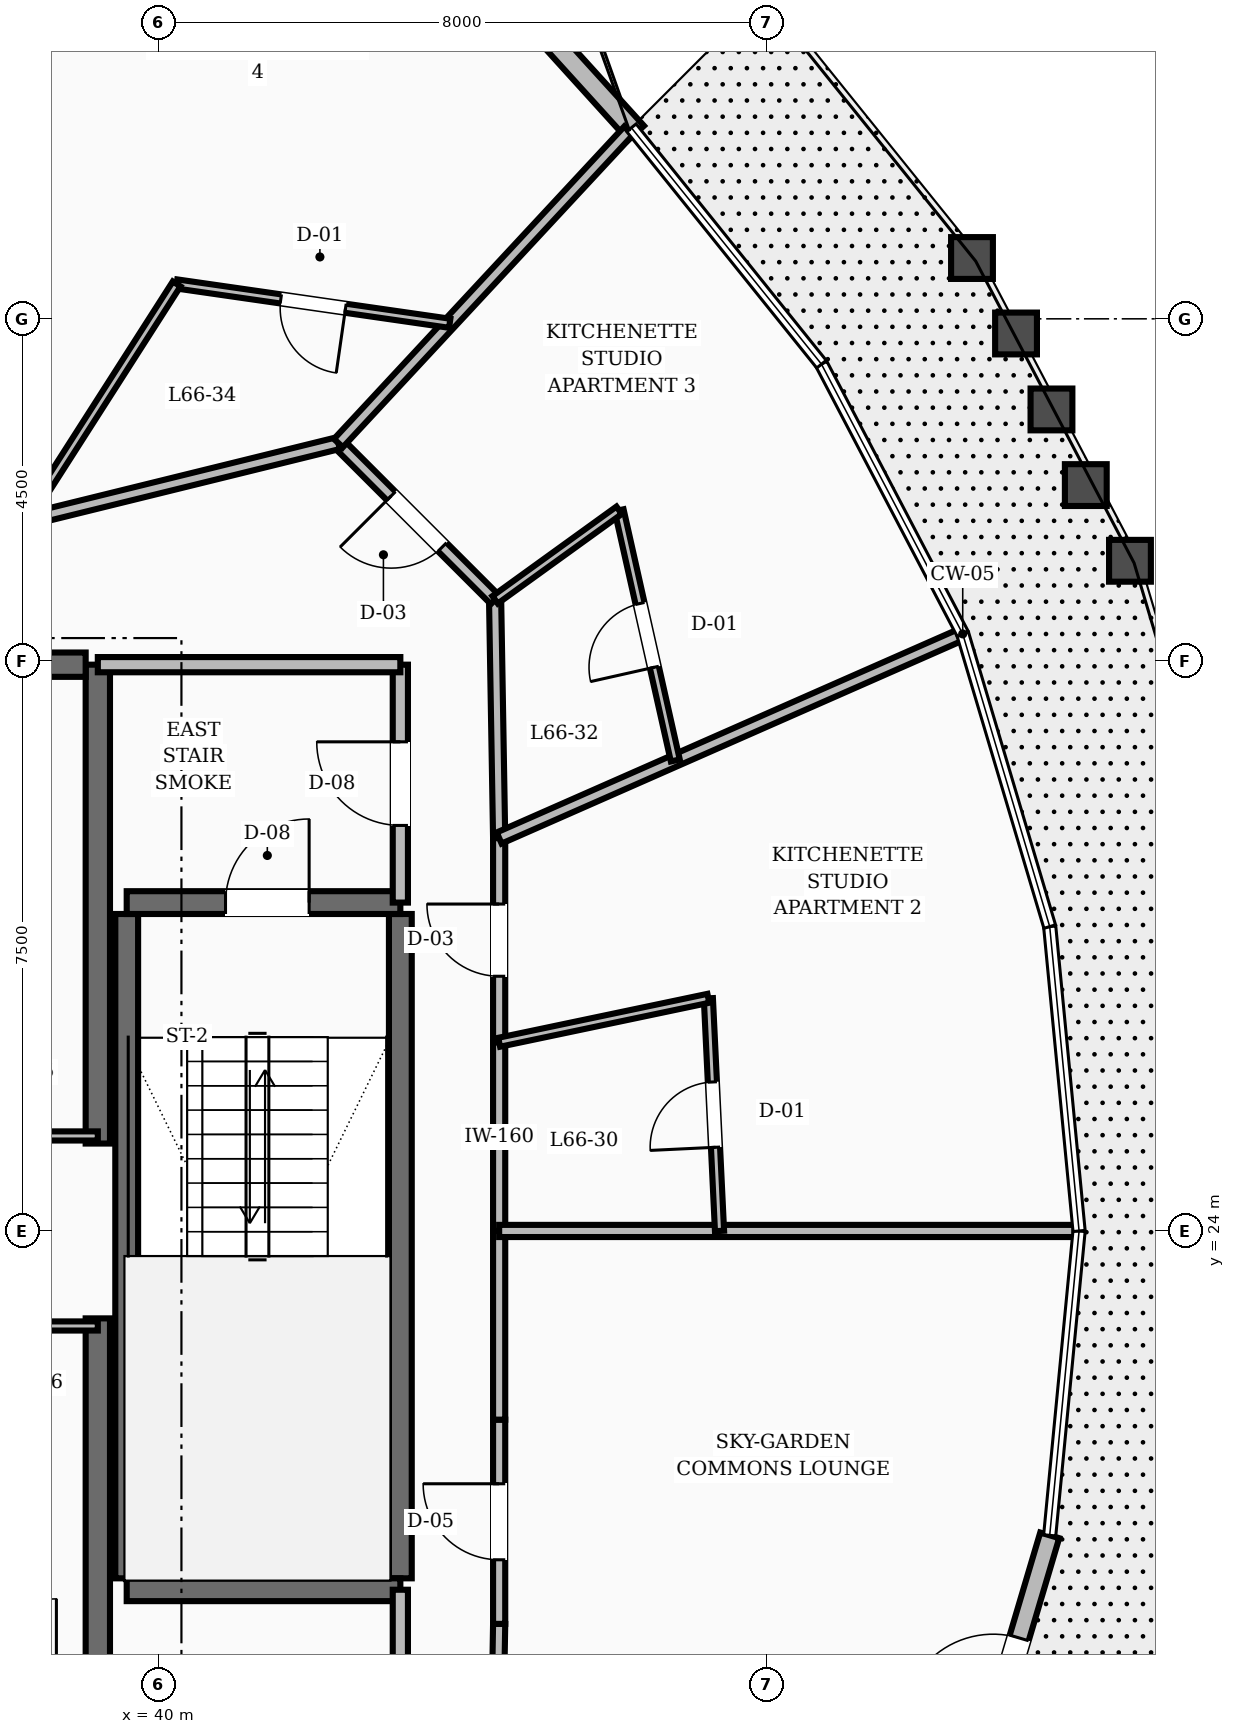
"""IFC4 building model, lengths in metres.
Left out: names, types, materials, properties, quantities, classifications, styles, units other than length and angle.
Written with IfcOpenShell. Run it as: python <this file> out.ifc"""

import sys

from ifc_helpers import new_model, si_unit, direction, frame, frame_2d, origin, place, context, subcontext, project, spatial, rectangle, extrude, element, fill, save


model = new_model("IFC4")
c1 = context("Model", 3, precision=1e-05, world=origin(), true_north=direction((0.0, 1.0)))
c2 = subcontext(c1, "Body", "Model", "MODEL_VIEW")
j1 = project(units=[si_unit("LENGTHUNIT", "METRE"), si_unit("PLANEANGLEUNIT", "RADIAN")], contexts=[c1])
p1 = place(None, origin())
s1 = spatial("IfcSite", under=j1, at=p1, CompositionType="ELEMENT")
p2 = place(p1, origin())
s2 = spatial("IfcBuilding", under=s1, at=p2, CompositionType="ELEMENT")
p3 = place(p2, frame((0.0, 0.0, 254.4)))
s3 = spatial("IfcBuildingStorey", under=s2, at=p3, CompositionType="ELEMENT", Elevation=254.4)
for number, where, z_axis, x_axis in (
    (1, (39.2, 16.55, 0.0), (0.0, 0.0, 1.0), (0.0, 1.0, 0.0)),
    (2, (39.2, 25.15, 0.0), (0.0, 0.0, 1.0), (0.0, 1.0, 0.0)),
):
    element("IfcWall", number, at=place(p3, frame(where, z_axis=z_axis, x_axis=x_axis)), inside=s3, PredefinedType="SHEAR", context=c2, shape_type="SweptSolid", body=[
        extrude(rectangle(XDim=6.3, YDim=0.32, at=frame_2d((3.15, 0.0))), origin(), (0.0, 0.0, 1.0), 3.6),
    ])
p4 = place(p3, frame((35.8, 31.45, 0.0), z_axis=(0.0, 0.0, 1.0), x_axis=(1.0, 0.0, 0.0)))
e3 = element("IfcWall", 3, at=p4, inside=s3, PredefinedType="SHEAR", context=c2, shape_type="SweptSolid", body=[
    extrude(rectangle(XDim=3.24, YDim=0.32, at=frame_2d((1.62, 0.0))), origin(), (0.0, 0.0, 1.0), 3.6),
])
p5 = place(p4, frame((0.3, 0.0, 0.0)))
e4 = element("IfcOpeningElement", 4, at=p5, cuts=e3, PredefinedType="OPENING", context=c2, shape_type="SweptSolid", body=[
    extrude(rectangle(XDim=1.1, YDim=2.1, at=frame_2d((0.55, 1.05))), frame((0.0, 0.17, 0.0), z_axis=(0.0, -1.0, 0.0), x_axis=(1.0, 0.0, 0.0)), (0.0, 0.0, 1.0), 0.34),
])
for number, where, z_axis, x_axis in (
    (5, (43.18, 19.43, 0.0), (0.0, 0.0, 1.0), (0.0, 1.0, 0.0)),
    (6, (39.58, 19.43, 0.0), (0.0, 0.0, 1.0), (0.0, 1.0, 0.0)),
):
    element("IfcWall", number, at=place(p3, frame(where, z_axis=z_axis, x_axis=x_axis)), inside=s3, PredefinedType="SHEAR", context=c2, shape_type="SweptSolid", body=[
        extrude(rectangle(XDim=8.74, YDim=0.3, at=frame_2d((4.37, 0.0))), origin(), (0.0, 0.0, 1.0), 3.6),
    ])
p6 = place(p3, frame((39.58, 19.28, 0.0), z_axis=(0.0, 0.0, 1.0), x_axis=(1.0, 0.0, 0.0)))
e7 = element("IfcWall", 7, at=p6, inside=s3, PredefinedType="SHEAR", context=c2, shape_type="SweptSolid", body=[
    extrude(rectangle(XDim=3.6, YDim=0.3, at=frame_2d((1.8, 0.0))), origin(), (0.0, 0.0, 1.0), 3.6),
])
p7 = place(p3, frame((39.58, 28.32, 0.0), z_axis=(0.0, 0.0, 1.0), x_axis=(1.0, 0.0, 0.0)))
e8 = element("IfcWall", 8, at=p7, inside=s3, PredefinedType="SHEAR", context=c2, shape_type="SweptSolid", body=[
    extrude(rectangle(XDim=3.6, YDim=0.3, at=frame_2d((1.8, 0.0))), origin(), (0.0, 0.0, 1.0), 3.6),
])
p8 = place(p7, frame((1.3, 0.0, 0.0)))
e9 = element("IfcOpeningElement", 9, at=p8, cuts=e8, PredefinedType="OPENING", context=c2, shape_type="SweptSolid", body=[
    extrude(rectangle(XDim=1.1, YDim=2.1, at=frame_2d((0.55, 1.05))), frame((0.0, 0.16, 0.0), z_axis=(0.0, -1.0, 0.0), x_axis=(1.0, 0.0, 0.0)), (0.0, 0.0, 1.0), 0.32),
])
p9 = place(p3, frame((46.281, 38.446, 0.0), z_axis=(0.0, 0.0, 1.0), x_axis=(-0.67165415444, 0.740864830332, 0.0)))
e10 = element("IfcWall", 10, at=p9, inside=s3, PredefinedType="STANDARD", context=c2, shape_type="SweptSolid", body=[
    extrude(rectangle(XDim=4.166, YDim=0.28, at=frame_2d((2.083, 0.0))), origin(), (0.0, 0.0, 1.0), 2.88),
])
p10 = place(p3, frame((50.579, 16.145, 0.0), z_axis=(0.0, 0.0, 1.0), x_axis=(0.284876689728, 0.9585641719, 0.0)))
e11 = element("IfcWall", 11, at=p10, inside=s3, PredefinedType="STANDARD", context=c2, shape_type="SweptSolid", body=[
    extrude(rectangle(XDim=4.017, YDim=0.26, at=frame_2d((2.008, 0.0))), origin(), (0.0, 0.0, 1.0), 2.88),
])
p11 = place(p10, frame((1.408, 0.0, 0.0)))
e12 = element("IfcOpeningElement", 12, at=p11, cuts=e11, PredefinedType="OPENING", context=c2, shape_type="SweptSolid", body=[
    extrude(rectangle(XDim=1.2, YDim=2.15, at=frame_2d((0.6, 1.075))), frame((0.0, 0.14, 0.0), z_axis=(0.0, -1.0, 0.0), x_axis=(1.0, 0.0, 0.0)), (0.0, 0.0, 1.0), 0.28),
])
p12 = place(p3, frame((43.18, 28.32, 0.0), z_axis=(0.0, 0.0, 1.0), x_axis=(0.0, 1.0, 0.0)))
e13 = element("IfcWall", 13, at=p12, inside=s3, PredefinedType="SOLIDWALL", context=c2, shape_type="SweptSolid", body=[
    extrude(rectangle(XDim=3.13, YDim=0.2, at=frame_2d((1.565, 0.0))), origin(), (0.0, 0.0, 1.0), 2.87),
])
p13 = place(p12, frame((1.015, 0.0, 0.0)))
e14 = element("IfcOpeningElement", 14, at=p13, cuts=e13, PredefinedType="OPENING", context=c2, shape_type="SweptSolid", body=[
    extrude(rectangle(XDim=1.1, YDim=2.1, at=frame_2d((0.55, 1.05))), frame((0.0, 0.11, 0.0), z_axis=(0.0, -1.0, 0.0), x_axis=(1.0, 0.0, 0.0)), (0.0, 0.0, 1.0), 0.22),
])
p14 = place(p3, frame((39.2, 31.45, 0.0), z_axis=(0.0, 0.0, 1.0), x_axis=(1.0, 0.0, 0.0)))
e15 = element("IfcWall", 15, at=p14, inside=s3, PredefinedType="SOLIDWALL", context=c2, shape_type="SweptSolid", body=[
    extrude(rectangle(XDim=3.98, YDim=0.2, at=frame_2d((1.99, 0.0))), origin(), (0.0, 0.0, 1.0), 2.87),
])
p15 = place(p3, frame((43.18, 16.55, 0.0), z_axis=(0.0, 0.0, 1.0), x_axis=(0.0, 1.0, 0.0)))
e16 = element("IfcWall", 16, at=p15, inside=s3, PredefinedType="SOLIDWALL", context=c2, shape_type="SweptSolid", body=[
    extrude(rectangle(XDim=2.73, YDim=0.2, at=frame_2d((1.365, 0.0))), origin(), (0.0, 0.0, 1.0), 2.87),
])
p16 = place(p15, frame((0.89, 0.0, 0.0)))
e17 = element("IfcOpeningElement", 17, at=p16, cuts=e16, PredefinedType="OPENING", context=c2, shape_type="SweptSolid", body=[
    extrude(rectangle(XDim=0.95, YDim=2.1, at=frame_2d((0.475, 1.05))), frame((0.0, 0.11, 0.0), z_axis=(0.0, -1.0, 0.0), x_axis=(1.0, 0.0, 0.0)), (0.0, 0.0, 1.0), 0.22),
])
for number, where, z_axis, x_axis in (
    (18, (37.4, 25.25, 0.0), (0.0, 0.0, 1.0), (1.0, 0.0, 0.0)),
    (19, (37.4, 22.75, 0.0), (0.0, 0.0, 1.0), (1.0, 0.0, 0.0)),
):
    element("IfcWall", number, at=place(p3, frame(where, z_axis=z_axis, x_axis=x_axis)), inside=s3, PredefinedType="PARTITIONING", context=c2, shape_type="SweptSolid", body=[
        extrude(rectangle(XDim=1.8, YDim=0.12, at=frame_2d((0.9, 0.0))), origin(), (0.0, 0.0, 1.0), 2.87),
    ])
p17 = place(p3, frame((44.48, 24.0, 0.0), z_axis=(0.0, 0.0, 1.0), x_axis=(0.0, 1.0, 0.0)))
e20 = element("IfcWall", 20, at=p17, inside=s3, PredefinedType="SOLIDWALL", context=c2, shape_type="SweptSolid", body=[
    extrude(rectangle(XDim=2.482, YDim=0.16, at=frame_2d((1.241, 0.0))), origin(), (0.0, 0.0, 1.0), 2.87),
])
p18 = place(p3, frame((44.48, 26.482, 0.0), z_axis=(0.0, 0.0, 1.0), x_axis=(0.0, 1.0, 0.0)))
e21 = element("IfcWall", 21, at=p18, inside=s3, PredefinedType="SOLIDWALL", context=c2, shape_type="SweptSolid", body=[
    extrude(rectangle(XDim=2.687, YDim=0.16, at=frame_2d((1.344, 0.0))), origin(), (0.0, 0.0, 1.0), 2.87),
])
p19 = place(p18, frame((0.868, 0.0, 0.0)))
e22 = element("IfcOpeningElement", 22, at=p19, cuts=e21, PredefinedType="OPENING", context=c2, shape_type="SweptSolid", body=[
    extrude(rectangle(XDim=0.95, YDim=2.1, at=frame_2d((0.475, 1.05))), frame((0.0, 0.09, 0.0), z_axis=(0.0, -1.0, 0.0), x_axis=(1.0, 0.0, 0.0)), (0.0, 0.0, 1.0), 0.18),
])
p20 = place(p3, frame((44.48, 29.169, 0.0), z_axis=(0.0, 0.0, 1.0), x_axis=(-0.016981035134, 0.999855811828, 0.0)))
e23 = element("IfcWall", 23, at=p20, inside=s3, PredefinedType="SOLIDWALL", context=c2, shape_type="SweptSolid", body=[
    extrude(rectangle(XDim=3.134, YDim=0.16, at=frame_2d((1.567, 0.0))), origin(), (0.0, 0.0, 1.0), 2.87),
])
p21 = place(p3, frame((44.427, 32.303, 0.0), z_axis=(0.0, 0.0, 1.0), x_axis=(-0.707106781187, 0.707106781187, 0.0)))
e24 = element("IfcWall", 24, at=p21, inside=s3, PredefinedType="SOLIDWALL", context=c2, shape_type="SweptSolid", body=[
    extrude(rectangle(XDim=2.916, YDim=0.16, at=frame_2d((1.458, 0.0))), origin(), (0.0, 0.0, 1.0), 2.87),
])
p22 = place(p21, frame((0.983, 0.0, 0.0)))
e25 = element("IfcOpeningElement", 25, at=p22, cuts=e24, PredefinedType="OPENING", context=c2, shape_type="SweptSolid", body=[
    extrude(rectangle(XDim=0.95, YDim=2.1, at=frame_2d((0.475, 1.05))), frame((0.0, 0.09, 0.0), z_axis=(0.0, -1.0, 0.0), x_axis=(1.0, 0.0, 0.0)), (0.0, 0.0, 1.0), 0.18),
])
p23 = place(p3, frame((42.365, 34.365, 0.0), z_axis=(0.0, 0.0, 1.0), x_axis=(-0.970939799552, -0.239323850978, 0.0)))
e26 = element("IfcWall", 26, at=p23, inside=s3, PredefinedType="SOLIDWALL", context=c2, shape_type="SweptSolid", body=[
    extrude(rectangle(XDim=4.241, YDim=0.16, at=frame_2d((2.12, 0.0))), origin(), (0.0, 0.0, 1.0), 2.87),
])
p24 = place(p3, frame((44.427, 15.697, 0.0), z_axis=(0.0, 0.0, 1.0), x_axis=(0.016981035134, 0.999855811828, 0.0)))
e27 = element("IfcWall", 27, at=p24, inside=s3, PredefinedType="SOLIDWALL", context=c2, shape_type="SweptSolid", body=[
    extrude(rectangle(XDim=3.134, YDim=0.16, at=frame_2d((1.567, 0.0))), origin(), (0.0, 0.0, 1.0), 2.87),
])
p25 = place(p3, frame((44.48, 18.831, 0.0), z_axis=(0.0, 0.0, 1.0), x_axis=(0.0, 1.0, 0.0)))
e28 = element("IfcWall", 28, at=p25, inside=s3, PredefinedType="SOLIDWALL", context=c2, shape_type="SweptSolid", body=[
    extrude(rectangle(XDim=2.687, YDim=0.16, at=frame_2d((1.344, 0.0))), origin(), (0.0, 0.0, 1.0), 2.87),
])
p26 = place(p25, frame((0.844, 0.0, 0.0)))
e29 = element("IfcOpeningElement", 29, at=p26, cuts=e28, PredefinedType="OPENING", context=c2, shape_type="SweptSolid", body=[
    extrude(rectangle(XDim=1.0, YDim=2.1, at=frame_2d((0.5, 1.05))), frame((0.0, 0.09, 0.0), z_axis=(0.0, -1.0, 0.0), x_axis=(1.0, 0.0, 0.0)), (0.0, 0.0, 1.0), 0.18),
])
p27 = place(p3, frame((44.48, 21.518, 0.0), z_axis=(0.0, 0.0, 1.0), x_axis=(0.0, 1.0, 0.0)))
e30 = element("IfcWall", 30, at=p27, inside=s3, PredefinedType="SOLIDWALL", context=c2, shape_type="SweptSolid", body=[
    extrude(rectangle(XDim=2.482, YDim=0.16, at=frame_2d((1.241, 0.0))), origin(), (0.0, 0.0, 1.0), 2.87),
])
p28 = place(p3, frame((44.48, 24.0, 0.0), z_axis=(0.0, 0.0, 1.0), x_axis=(1.0, 0.0, 0.0)))
e31 = element("IfcWall", 31, at=p28, inside=s3, PredefinedType="SOLIDWALL", context=c2, shape_type="SweptSolid", body=[
    extrude(rectangle(XDim=7.58, YDim=0.16, at=frame_2d((3.79, 0.0))), origin(), (0.0, 0.0, 1.0), 2.87),
])
p29 = place(p3, frame((47.379, 24.0, 0.0), z_axis=(0.0, 0.0, 1.0), x_axis=(-0.04788311561, 0.998852945753, 0.0)))
e32 = element("IfcWall", 32, at=p29, inside=s3, PredefinedType="PARTITIONING", context=c2, shape_type="SweptSolid", body=[
    extrude(rectangle(XDim=3.064, YDim=0.12, at=frame_2d((1.532, 0.0))), origin(), (0.0, 0.0, 1.0), 2.87),
])
p30 = place(p29, frame((1.102, 0.0, 0.0)))
e33 = element("IfcOpeningElement", 33, at=p30, cuts=e32, PredefinedType="OPENING", context=c2, shape_type="SweptSolid", body=[
    extrude(rectangle(XDim=0.86, YDim=2.1, at=frame_2d((0.43, 1.05))), frame((0.0, 0.07, 0.0), z_axis=(0.0, -1.0, 0.0), x_axis=(1.0, 0.0, 0.0)), (0.0, 0.0, 1.0), 0.14),
])
p31 = place(p3, frame((44.48, 26.482, 0.0), z_axis=(0.0, 0.0, 1.0), x_axis=(0.978627999085, 0.205638613609, 0.0)))
e34 = element("IfcWall", 34, at=p31, inside=s3, PredefinedType="PARTITIONING", context=c2, shape_type="SweptSolid", body=[
    extrude(rectangle(XDim=2.812, YDim=0.12, at=frame_2d((1.406, 0.0))), origin(), (0.0, 0.0, 1.0), 2.87),
])
p32 = place(p3, frame((44.48, 29.169, 0.0), z_axis=(0.0, 0.0, 1.0), x_axis=(0.915205048485, 0.40298848523, 0.0)))
e35 = element("IfcWall", 35, at=p32, inside=s3, PredefinedType="SOLIDWALL", context=c2, shape_type="SweptSolid", body=[
    extrude(rectangle(XDim=6.614, YDim=0.16, at=frame_2d((3.307, 0.0))), origin(), (0.0, 0.0, 1.0), 2.87),
])
p33 = place(p3, frame((46.798, 30.19, 0.0), z_axis=(0.0, 0.0, 1.0), x_axis=(-0.219152241428, 0.97569067592, 0.0)))
e36 = element("IfcWall", 36, at=p33, inside=s3, PredefinedType="PARTITIONING", context=c2, shape_type="SweptSolid", body=[
    extrude(rectangle(XDim=3.373, YDim=0.12, at=frame_2d((1.687, 0.0))), origin(), (0.0, 0.0, 1.0), 2.87),
])
p34 = place(p33, frame((1.257, 0.0, 0.0)))
e37 = element("IfcOpeningElement", 37, at=p34, cuts=e36, PredefinedType="OPENING", context=c2, shape_type="SweptSolid", body=[
    extrude(rectangle(XDim=0.86, YDim=2.1, at=frame_2d((0.43, 1.05))), frame((0.0, 0.07, 0.0), z_axis=(0.0, -1.0, 0.0), x_axis=(1.0, 0.0, 0.0)), (0.0, 0.0, 1.0), 0.14),
])
p35 = place(p3, frame((44.427, 32.303, 0.0), z_axis=(0.0, 0.0, 1.0), x_axis=(0.810771991246, 0.58536209154, 0.0)))
e38 = element("IfcWall", 38, at=p35, inside=s3, PredefinedType="PARTITIONING", context=c2, shape_type="SweptSolid", body=[
    extrude(rectangle(XDim=2.012, YDim=0.12, at=frame_2d((1.006, 0.0))), origin(), (0.0, 0.0, 1.0), 2.87),
])
p36 = place(p3, frame((42.365, 34.365, 0.0), z_axis=(0.0, 0.0, 1.0), x_axis=(0.680662948216, 0.732596717797, 0.0)))
e39 = element("IfcWall", 39, at=p36, inside=s3, PredefinedType="SOLIDWALL", context=c2, shape_type="SweptSolid", body=[
    extrude(rectangle(XDim=5.613, YDim=0.16, at=frame_2d((2.807, 0.0))), origin(), (0.0, 0.0, 1.0), 2.87),
])
p37 = place(p3, frame((43.83, 35.941, 0.0), z_axis=(0.0, 0.0, 1.0), x_axis=(-0.989771139655, 0.142664260089, 0.0)))
e40 = element("IfcWall", 40, at=p37, inside=s3, PredefinedType="PARTITIONING", context=c2, shape_type="SweptSolid", body=[
    extrude(rectangle(XDim=3.63, YDim=0.12, at=frame_2d((1.815, 0.0))), origin(), (0.0, 0.0, 1.0), 2.87),
])
p38 = place(p37, frame((1.385, 0.0, 0.0)))
e41 = element("IfcOpeningElement", 41, at=p38, cuts=e40, PredefinedType="OPENING", context=c2, shape_type="SweptSolid", body=[
    extrude(rectangle(XDim=0.86, YDim=2.1, at=frame_2d((0.43, 1.05))), frame((0.0, 0.07, 0.0), z_axis=(0.0, -1.0, 0.0), x_axis=(1.0, 0.0, 0.0)), (0.0, 0.0, 1.0), 0.14),
])
p39 = place(p3, frame((38.248, 33.35, 0.0), z_axis=(0.0, 0.0, 1.0), x_axis=(0.538988003625, 0.842313440442, 0.0)))
e42 = element("IfcWall", 42, at=p39, inside=s3, PredefinedType="PARTITIONING", context=c2, shape_type="SweptSolid", body=[
    extrude(rectangle(XDim=3.691, YDim=0.12, at=frame_2d((1.846, 0.0))), origin(), (0.0, 0.0, 1.0), 2.87),
])
p40 = place(p3, frame((35.873, 33.35, 0.0), z_axis=(0.0, 0.0, 1.0), x_axis=(0.370196038219, 0.92895365508, 0.0)))
e43 = element("IfcWall", 43, at=p40, inside=s3, PredefinedType="SOLIDWALL", context=c2, shape_type="SweptSolid", body=[
    extrude(rectangle(XDim=10.855, YDim=0.16, at=frame_2d((5.428, 0.0))), origin(), (0.0, 0.0, 1.0), 2.87),
])
p41 = place(p11, origin())
e44 = element("IfcDoor", 44, at=p41, inside=s3, OperationType="SINGLE_SWING_LEFT", PredefinedType="DOOR", context=c2, shape_type="SweptSolid", body=[
    extrude(rectangle(XDim=1.2, YDim=2.15, at=frame_2d((0.6, 1.075))), frame((0.0, 0.025, 0.0), z_axis=(0.0, -1.0, 0.0), x_axis=(1.0, 0.0, 0.0)), (0.0, 0.0, 1.0), 0.05),
])
fill(e12, e44)
p42 = place(p8, origin())
e45 = element("IfcDoor", 45, at=p42, inside=s3, OperationType="SINGLE_SWING_RIGHT", PredefinedType="DOOR", context=c2, shape_type="SweptSolid", body=[
    extrude(rectangle(XDim=1.1, YDim=2.1, at=frame_2d((0.55, 1.05))), frame((0.0, 0.025, 0.0), z_axis=(0.0, -1.0, 0.0), x_axis=(1.0, 0.0, 0.0)), (0.0, 0.0, 1.0), 0.05),
])
fill(e9, e45)
p43 = place(p13, origin())
e46 = element("IfcDoor", 46, at=p43, inside=s3, OperationType="SINGLE_SWING_RIGHT", PredefinedType="DOOR", context=c2, shape_type="SweptSolid", body=[
    extrude(rectangle(XDim=1.1, YDim=2.1, at=frame_2d((0.55, 1.05))), frame((0.0, 0.025, 0.0), z_axis=(0.0, -1.0, 0.0), x_axis=(1.0, 0.0, 0.0)), (0.0, 0.0, 1.0), 0.05),
])
fill(e14, e46)
p44 = place(p26, origin())
e47 = element("IfcDoor", 47, at=p44, inside=s3, OperationType="SINGLE_SWING_RIGHT", PredefinedType="DOOR", context=c2, shape_type="SweptSolid", body=[
    extrude(rectangle(XDim=1.0, YDim=2.1, at=frame_2d((0.5, 1.05))), frame((0.0, 0.025, 0.0), z_axis=(0.0, -1.0, 0.0), x_axis=(1.0, 0.0, 0.0)), (0.0, 0.0, 1.0), 0.05),
])
fill(e29, e47)
p45 = place(p30, origin())
e48 = element("IfcDoor", 48, at=p45, inside=s3, OperationType="SINGLE_SWING_LEFT", PredefinedType="DOOR", context=c2, shape_type="SweptSolid", body=[
    extrude(rectangle(XDim=0.86, YDim=2.1, at=frame_2d((0.43, 1.05))), frame((0.0, 0.025, 0.0), z_axis=(0.0, -1.0, 0.0), x_axis=(1.0, 0.0, 0.0)), (0.0, 0.0, 1.0), 0.05),
])
fill(e33, e48)
p46 = place(p19, origin())
e49 = element("IfcDoor", 49, at=p46, inside=s3, OperationType="SINGLE_SWING_RIGHT", PredefinedType="DOOR", context=c2, shape_type="SweptSolid", body=[
    extrude(rectangle(XDim=0.95, YDim=2.1, at=frame_2d((0.475, 1.05))), frame((0.0, 0.025, 0.0), z_axis=(0.0, -1.0, 0.0), x_axis=(1.0, 0.0, 0.0)), (0.0, 0.0, 1.0), 0.05),
])
fill(e22, e49)
p47 = place(p34, origin())
e50 = element("IfcDoor", 50, at=p47, inside=s3, OperationType="SINGLE_SWING_LEFT", PredefinedType="DOOR", context=c2, shape_type="SweptSolid", body=[
    extrude(rectangle(XDim=0.86, YDim=2.1, at=frame_2d((0.43, 1.05))), frame((0.0, 0.025, 0.0), z_axis=(0.0, -1.0, 0.0), x_axis=(1.0, 0.0, 0.0)), (0.0, 0.0, 1.0), 0.05),
])
fill(e37, e50)
p48 = place(p22, origin())
e51 = element("IfcDoor", 51, at=p48, inside=s3, OperationType="SINGLE_SWING_RIGHT", PredefinedType="DOOR", context=c2, shape_type="SweptSolid", body=[
    extrude(rectangle(XDim=0.95, YDim=2.1, at=frame_2d((0.475, 1.05))), frame((0.0, 0.025, 0.0), z_axis=(0.0, -1.0, 0.0), x_axis=(1.0, 0.0, 0.0)), (0.0, 0.0, 1.0), 0.05),
])
fill(e25, e51)
p49 = place(p38, origin())
e52 = element("IfcDoor", 52, at=p49, inside=s3, OperationType="SINGLE_SWING_LEFT", PredefinedType="DOOR", context=c2, shape_type="SweptSolid", body=[
    extrude(rectangle(XDim=0.86, YDim=2.1, at=frame_2d((0.43, 1.05))), frame((0.0, 0.025, 0.0), z_axis=(0.0, -1.0, 0.0), x_axis=(1.0, 0.0, 0.0)), (0.0, 0.0, 1.0), 0.05),
])
fill(e41, e52)
save(model, sys.argv[1])
